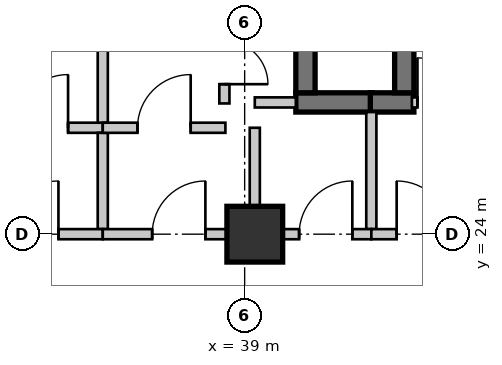
"""IFC4 building model, lengths in metres.
Left out: names, types, materials, properties, quantities, classifications, styles, units other than length and angle.
Written with IfcOpenShell. Run it as: python <this file> out.ifc"""

import sys

from ifc_helpers import new_model, si_unit, direction, frame, frame_2d, origin, origin_2d, place, context, subcontext, project, spatial, rectangle, extrude, source, transform, mapped, element, fill, save


model = new_model("IFC4")
c1 = context("Model", 3, precision=1e-05, world=origin(), true_north=direction((0.0, 1.0)))
c2 = subcontext(c1, "Body", "Model", "MODEL_VIEW")
j1 = project(units=[si_unit("LENGTHUNIT", "METRE"), si_unit("PLANEANGLEUNIT", "RADIAN")], contexts=[c1])
p1 = place(None, origin())
s1 = spatial("IfcSite", under=j1, at=p1, CompositionType="ELEMENT")
p2 = place(p1, origin())
s2 = spatial("IfcBuilding", under=s1, at=p2, CompositionType="ELEMENT")
p3 = place(p2, frame((0.0, 0.0, 12.95)))
s3 = spatial("IfcBuildingStorey", under=s2, at=p3, CompositionType="ELEMENT", Elevation=12.95)
m1 = source(origin(), c2, "Body", "SweptSolid", [
    extrude(rectangle(XDim=1.1, YDim=1.1, at=origin_2d()), origin(), (0.0, 0.0, 1.0), 3.85),
])
p4 = place(p3, frame((39.2, 24.0, 0.0), z_axis=(0.0, 0.0, 1.0), x_axis=(1.0, 0.0, 0.0)))
e1 = element("IfcColumn", 1, at=p4, inside=s3, PredefinedType="COLUMN", context=c2, shape_type="MappedRepresentation", body=[
    mapped(m1, transform((0.0, 0.0, 0.0), scale=1.0)),
])
m2 = source(origin(), c2, "Body", "SweptSolid", [
    extrude(rectangle(XDim=1.51, YDim=0.38, at=frame_2d((0.755, 0.0))), origin(), (0.0, 0.0, 1.0), 3.43),
])
p5 = place(p3, frame((40.01, 26.6, 0.0), z_axis=(0.0, 0.0, 1.0), x_axis=(1.0, 0.0, 0.0)))
e2 = element("IfcWall", 2, at=p5, inside=s3, PredefinedType="SHEAR", context=c2, shape_type="MappedRepresentation", body=[
    mapped(m2, transform((0.0, 0.0, 0.0), scale=1.0)),
])
m3 = source(origin(), c2, "Body", "SweptSolid", [
    extrude(rectangle(XDim=1.22, YDim=0.38, at=frame_2d((0.61, 0.0))), origin(), (0.0, 0.0, 1.0), 3.43),
])
p6 = place(p3, frame((40.2, 28.01, 0.0), z_axis=(0.0, 0.0, 1.0), x_axis=(0.0, -1.0, 0.0)))
e3 = element("IfcWall", 3, at=p6, inside=s3, PredefinedType="SHEAR", context=c2, shape_type="MappedRepresentation", body=[
    mapped(m3, transform((0.0, 0.0, 0.0), scale=1.0)),
])
m4 = source(origin(), c2, "Body", "SweptSolid", [
    extrude(rectangle(XDim=0.86, YDim=0.38, at=frame_2d((0.43, 0.0))), origin(), (0.0, 0.0, 1.0), 3.43),
])
p7 = place(p3, frame((41.48, 26.6, 0.0), z_axis=(0.0, 0.0, 1.0), x_axis=(1.0, 0.0, 0.0)))
e4 = element("IfcWall", 4, at=p7, inside=s3, PredefinedType="SHEAR", context=c2, shape_type="MappedRepresentation", body=[
    mapped(m4, transform((0.0, 0.0, 0.0), scale=1.0)),
])
p8 = place(p3, frame((42.15, 26.79, 0.0), z_axis=(0.0, 0.0, 1.0), x_axis=(0.0, 1.0, 0.0)))
e5 = element("IfcWall", 5, at=p8, inside=s3, PredefinedType="SHEAR", context=c2, shape_type="MappedRepresentation", body=[
    mapped(m3, transform((0.0, 0.0, 0.0), scale=1.0)),
])
m5 = source(origin(), c2, "Body", "SweptSolid", [
    extrude(rectangle(XDim=2.42, YDim=0.2, at=frame_2d((1.21, 0.0))), origin(), (0.0, 0.0, 1.0), 3.43),
])
p9 = place(p3, frame((33.78, 26.1, 0.0), z_axis=(0.0, 0.0, 1.0), x_axis=(1.0, 0.0, 0.0)))
e6 = element("IfcWall", 6, at=p9, inside=s3, PredefinedType="SOLIDWALL", context=c2, shape_type="MappedRepresentation", body=[
    mapped(m5, transform((0.0, 0.0, 0.0), scale=1.0)),
])
m6 = source(origin(), c2, "Body", "SweptSolid", [
    extrude(rectangle(XDim=1.05, YDim=2.1, at=frame_2d((0.525, 1.05))), frame((0.0, 0.11, 0.0), z_axis=(0.0, -1.0, 0.0), x_axis=(1.0, 0.0, 0.0)), (0.0, 0.0, 1.0), 0.22),
])
p10 = place(p9, frame((0.685, 0.0, 0.0)))
e7 = element("IfcOpeningElement", 7, at=p10, cuts=e6, PredefinedType="OPENING", context=c2, shape_type="MappedRepresentation", body=[
    mapped(m6, transform((0.0, 0.0, 0.0), scale=1.0)),
])
m7 = source(origin(), c2, "Body", "SweptSolid", [
    extrude(rectangle(XDim=1.9, YDim=0.2, at=frame_2d((0.95, 0.0))), origin(), (0.0, 0.0, 1.0), 3.43),
])
p11 = place(p3, frame((36.2, 26.0, 0.0), z_axis=(0.0, 0.0, 1.0), x_axis=(0.0, -1.0, 0.0)))
e8 = element("IfcWall", 8, at=p11, inside=s3, PredefinedType="SOLIDWALL", context=c2, shape_type="MappedRepresentation", body=[
    mapped(m7, transform((0.0, 0.0, 0.0), scale=1.0)),
])
m8 = source(origin(), c2, "Body", "SweptSolid", [
    extrude(rectangle(XDim=2.8, YDim=0.2, at=frame_2d((1.4, 0.0))), origin(), (0.0, 0.0, 1.0), 2.97),
])
p12 = place(p3, frame((36.2, 24.0, 0.0), z_axis=(0.0, 0.0, 1.0), x_axis=(-1.0, 0.0, 0.0)))
e9 = element("IfcWall", 9, at=p12, inside=s3, PredefinedType="SOLIDWALL", context=c2, shape_type="MappedRepresentation", body=[
    mapped(m8, transform((0.0, 0.0, 0.0), scale=1.0)),
])
p13 = place(p12, frame((0.875, 0.0, 0.0)))
e10 = element("IfcOpeningElement", 10, at=p13, cuts=e9, PredefinedType="OPENING", context=c2, shape_type="MappedRepresentation", body=[
    mapped(m6, transform((0.0, 0.0, 0.0), scale=1.0)),
])
m9 = source(origin(), c2, "Body", "SweptSolid", [
    extrude(rectangle(XDim=1.9, YDim=0.2, at=frame_2d((0.95, 0.0))), origin(), (0.0, 0.0, 1.0), 3.43),
])
p14 = place(p3, frame((36.2, 28.1, 0.0), z_axis=(0.0, 0.0, 1.0), x_axis=(0.0, -1.0, 0.0)))
e11 = element("IfcWall", 11, at=p14, inside=s3, PredefinedType="SOLIDWALL", context=c2, shape_type="MappedRepresentation", body=[
    mapped(m9, transform((0.0, 0.0, 0.0), scale=1.0)),
])
m10 = source(origin(), c2, "Body", "SweptSolid", [
    extrude(rectangle(XDim=2.42, YDim=0.2, at=frame_2d((1.21, 0.0))), origin(), (0.0, 0.0, 1.0), 3.43),
])
p15 = place(p3, frame((36.2, 26.1, 0.0), z_axis=(0.0, 0.0, 1.0), x_axis=(1.0, 0.0, 0.0)))
e12 = element("IfcWall", 12, at=p15, inside=s3, PredefinedType="SOLIDWALL", context=c2, shape_type="MappedRepresentation", body=[
    mapped(m10, transform((0.0, 0.0, 0.0), scale=1.0)),
])
p16 = place(p15, frame((0.685, 0.0, 0.0)))
e13 = element("IfcOpeningElement", 13, at=p16, cuts=e12, PredefinedType="OPENING", context=c2, shape_type="MappedRepresentation", body=[
    mapped(m6, transform((0.0, 0.0, 0.0), scale=1.0)),
])
m11 = source(origin(), c2, "Body", "SweptSolid", [
    extrude(rectangle(XDim=2.0, YDim=0.2, at=frame_2d((1.0, 0.0))), origin(), (0.0, 0.0, 1.0), 2.97),
])
p17 = place(p3, frame((39.2, 26.1, 0.0), z_axis=(0.0, 0.0, 1.0), x_axis=(0.0, -1.0, 0.0)))
e14 = element("IfcWall", 14, at=p17, inside=s3, PredefinedType="SOLIDWALL", context=c2, shape_type="MappedRepresentation", body=[
    mapped(m11, transform((0.0, 0.0, 0.0), scale=1.0)),
])
m12 = source(origin(), c2, "Body", "SweptSolid", [
    extrude(rectangle(XDim=3.0, YDim=0.2, at=frame_2d((1.5, 0.0))), origin(), (0.0, 0.0, 1.0), 2.97),
])
p18 = place(p3, frame((39.2, 24.0, 0.0), z_axis=(0.0, 0.0, 1.0), x_axis=(-1.0, 0.0, 0.0)))
e15 = element("IfcWall", 15, at=p18, inside=s3, PredefinedType="SOLIDWALL", context=c2, shape_type="MappedRepresentation", body=[
    mapped(m12, transform((0.0, 0.0, 0.0), scale=1.0)),
])
p19 = place(p18, frame((0.975, 0.0, 0.0)))
e16 = element("IfcOpeningElement", 16, at=p19, cuts=e15, PredefinedType="OPENING", context=c2, shape_type="MappedRepresentation", body=[
    mapped(m6, transform((0.0, 0.0, 0.0), scale=1.0)),
])
m13 = source(origin(), c2, "Body", "SweptSolid", [
    extrude(rectangle(XDim=1.43, YDim=0.2, at=frame_2d((0.715, 0.0))), origin(), (0.0, 0.0, 1.0), 3.43),
])
p20 = place(p3, frame((38.6, 28.01, 0.0), z_axis=(0.0, 0.0, 1.0), x_axis=(0.0, -1.0, 0.0)))
e17 = element("IfcWall", 17, at=p20, inside=s3, PredefinedType="SOLIDWALL", context=c2, shape_type="MappedRepresentation", body=[
    mapped(m13, transform((0.0, 0.0, 0.0), scale=1.0)),
])
m14 = source(origin(), c2, "Body", "SweptSolid", [
    extrude(rectangle(XDim=0.86, YDim=2.1, at=frame_2d((0.43, 1.05))), frame((0.0, 0.11, 0.0), z_axis=(0.0, -1.0, 0.0), x_axis=(1.0, 0.0, 0.0)), (0.0, 0.0, 1.0), 0.22),
])
p21 = place(p20, frame((0.19, 0.0, 0.0)))
e18 = element("IfcOpeningElement", 18, at=p21, cuts=e17, PredefinedType="OPENING", context=c2, shape_type="MappedRepresentation", body=[
    mapped(m14, transform((0.0, 0.0, 0.0), scale=1.0)),
])
m15 = source(origin(), c2, "Body", "SweptSolid", [
    extrude(rectangle(XDim=0.81, YDim=0.2, at=frame_2d((0.405, 0.0))), origin(), (0.0, 0.0, 1.0), 3.43),
])
p22 = place(p3, frame((39.2, 26.6, 0.0), z_axis=(0.0, 0.0, 1.0), x_axis=(1.0, 0.0, 0.0)))
e19 = element("IfcWall", 19, at=p22, inside=s3, PredefinedType="SOLIDWALL", context=c2, shape_type="MappedRepresentation", body=[
    mapped(m15, transform((0.0, 0.0, 0.0), scale=1.0)),
])
m16 = source(origin(), c2, "Body", "SweptSolid", [
    extrude(rectangle(XDim=2.31, YDim=0.2, at=frame_2d((1.155, 0.0))), origin(), (0.0, 0.0, 1.0), 3.43),
])
p23 = place(p3, frame((41.5, 26.41, 0.0), z_axis=(0.0, 0.0, 1.0), x_axis=(0.0, -1.0, 0.0)))
e20 = element("IfcWall", 20, at=p23, inside=s3, PredefinedType="SOLIDWALL", context=c2, shape_type="MappedRepresentation", body=[
    mapped(m16, transform((0.0, 0.0, 0.0), scale=1.0)),
])
m17 = source(origin(), c2, "Body", "SweptSolid", [
    extrude(rectangle(XDim=2.3, YDim=0.2, at=frame_2d((1.15, 0.0))), origin(), (0.0, 0.0, 1.0), 2.897),
])
p24 = place(p3, frame((41.5, 24.0, 0.0), z_axis=(0.0, 0.0, 1.0), x_axis=(-1.0, 0.0, 0.0)))
e21 = element("IfcWall", 21, at=p24, inside=s3, PredefinedType="SOLIDWALL", context=c2, shape_type="MappedRepresentation", body=[
    mapped(m17, transform((0.0, 0.0, 0.0), scale=1.0)),
])
p25 = place(p24, frame((0.375, 0.0, 0.0)))
e22 = element("IfcOpeningElement", 22, at=p25, cuts=e21, PredefinedType="OPENING", context=c2, shape_type="MappedRepresentation", body=[
    mapped(m6, transform((0.0, 0.0, 0.0), scale=1.0)),
])
m18 = source(origin(), c2, "Body", "SweptSolid", [
    extrude(rectangle(XDim=1.25, YDim=0.2, at=frame_2d((0.625, 0.0))), origin(), (0.0, 0.0, 1.0), 3.43),
])
p26 = place(p3, frame((42.3, 26.6, 0.0), z_axis=(0.0, 0.0, 1.0), x_axis=(1.0, 0.0, 0.0)))
e23 = element("IfcWall", 23, at=p26, inside=s3, PredefinedType="SOLIDWALL", context=c2, shape_type="MappedRepresentation", body=[
    mapped(m18, transform((0.0, 0.0, 0.0), scale=1.0)),
])
m19 = source(origin(), c2, "Body", "SweptSolid", [
    extrude(rectangle(XDim=0.88, YDim=2.1, at=frame_2d((0.44, 1.05))), frame((0.0, 0.11, 0.0), z_axis=(0.0, -1.0, 0.0), x_axis=(1.0, 0.0, 0.0)), (0.0, 0.0, 1.0), 0.22),
])
p27 = place(p26, frame((0.11, 0.0, 0.0)))
e24 = element("IfcOpeningElement", 24, at=p27, cuts=e23, PredefinedType="OPENING", context=c2, shape_type="MappedRepresentation", body=[
    mapped(m19, transform((0.0, 0.0, 0.0), scale=1.0)),
])
m20 = source(origin(), c2, "Body", "SweptSolid", [
    extrude(rectangle(XDim=2.05, YDim=0.2, at=frame_2d((1.025, 0.0))), origin(), (0.0, 0.0, 1.0), 2.897),
])
p28 = place(p3, frame((43.55, 24.0, 0.0), z_axis=(0.0, 0.0, 1.0), x_axis=(-1.0, 0.0, 0.0)))
e25 = element("IfcWall", 25, at=p28, inside=s3, PredefinedType="SOLIDWALL", context=c2, shape_type="MappedRepresentation", body=[
    mapped(m20, transform((0.0, 0.0, 0.0), scale=1.0)),
])
p29 = place(p28, frame((0.5, 0.0, 0.0)))
e26 = element("IfcOpeningElement", 26, at=p29, cuts=e25, PredefinedType="OPENING", context=c2, shape_type="MappedRepresentation", body=[
    mapped(m6, transform((0.0, 0.0, 0.0), scale=1.0)),
])
m21 = source(origin(), c2, "Body", "SweptSolid", [
    extrude(rectangle(XDim=1.05, YDim=2.1, at=frame_2d((0.525, 1.05))), frame((0.0, 0.025, 0.0), z_axis=(0.0, -1.0, 0.0), x_axis=(1.0, 0.0, 0.0)), (0.0, 0.0, 1.0), 0.05),
])
p30 = place(p10, origin())
e27 = element("IfcDoor", 27, at=p30, inside=s3, OperationType="SINGLE_SWING_RIGHT", PredefinedType="DOOR", context=c2, shape_type="MappedRepresentation", body=[
    mapped(m21, transform((0.0, 0.0, 0.0), scale=1.0)),
])
fill(e7, e27)
p31 = place(p13, frame((1.05, 0.0, 0.0), z_axis=(0.0, 0.0, 1.0), x_axis=(-1.0, 0.0, 0.0)))
e28 = element("IfcDoor", 28, at=p31, inside=s3, OperationType="SINGLE_SWING_RIGHT", PredefinedType="DOOR", context=c2, shape_type="MappedRepresentation", body=[
    mapped(m21, transform((0.0, 0.0, 0.0), scale=1.0)),
])
fill(e10, e28)
p32 = place(p16, origin())
e29 = element("IfcDoor", 29, at=p32, inside=s3, OperationType="SINGLE_SWING_RIGHT", PredefinedType="DOOR", context=c2, shape_type="MappedRepresentation", body=[
    mapped(m21, transform((0.0, 0.0, 0.0), scale=1.0)),
])
fill(e13, e29)
p33 = place(p19, frame((1.05, 0.0, 0.0), z_axis=(0.0, 0.0, 1.0), x_axis=(-1.0, 0.0, 0.0)))
e30 = element("IfcDoor", 30, at=p33, inside=s3, OperationType="SINGLE_SWING_RIGHT", PredefinedType="DOOR", context=c2, shape_type="MappedRepresentation", body=[
    mapped(m21, transform((0.0, 0.0, 0.0), scale=1.0)),
])
fill(e16, e30)
p34 = place(p25, frame((1.05, 0.0, 0.0), z_axis=(0.0, 0.0, 1.0), x_axis=(-1.0, 0.0, 0.0)))
e31 = element("IfcDoor", 31, at=p34, inside=s3, OperationType="SINGLE_SWING_RIGHT", PredefinedType="DOOR", context=c2, shape_type="MappedRepresentation", body=[
    mapped(m21, transform((0.0, 0.0, 0.0), scale=1.0)),
])
fill(e22, e31)
m22 = source(origin(), c2, "Body", "SweptSolid", [
    extrude(rectangle(XDim=0.88, YDim=2.1, at=frame_2d((0.44, 1.05))), frame((0.0, 0.025, 0.0), z_axis=(0.0, -1.0, 0.0), x_axis=(1.0, 0.0, 0.0)), (0.0, 0.0, 1.0), 0.05),
])
p35 = place(p27, origin())
e32 = element("IfcDoor", 32, at=p35, inside=s3, OperationType="SINGLE_SWING_LEFT", PredefinedType="DOOR", context=c2, shape_type="MappedRepresentation", body=[
    mapped(m22, transform((0.0, 0.0, 0.0), scale=1.0)),
])
fill(e24, e32)
p36 = place(p29, frame((1.05, 0.0, 0.0), z_axis=(0.0, 0.0, 1.0), x_axis=(-1.0, 0.0, 0.0)))
e33 = element("IfcDoor", 33, at=p36, inside=s3, OperationType="SINGLE_SWING_LEFT", PredefinedType="DOOR", context=c2, shape_type="MappedRepresentation", body=[
    mapped(m21, transform((0.0, 0.0, 0.0), scale=1.0)),
])
fill(e26, e33)
m23 = source(origin(), c2, "Body", "SweptSolid", [
    extrude(rectangle(XDim=0.86, YDim=2.1, at=frame_2d((0.43, 1.05))), frame((0.0, 0.025, 0.0), z_axis=(0.0, -1.0, 0.0), x_axis=(1.0, 0.0, 0.0)), (0.0, 0.0, 1.0), 0.05),
])
p37 = place(p21, origin())
e34 = element("IfcDoor", 34, at=p37, inside=s3, OperationType="SINGLE_SWING_RIGHT", PredefinedType="DOOR", context=c2, shape_type="MappedRepresentation", body=[
    mapped(m23, transform((0.0, 0.0, 0.0), scale=1.0)),
])
fill(e18, e34)
save(model, sys.argv[1])
